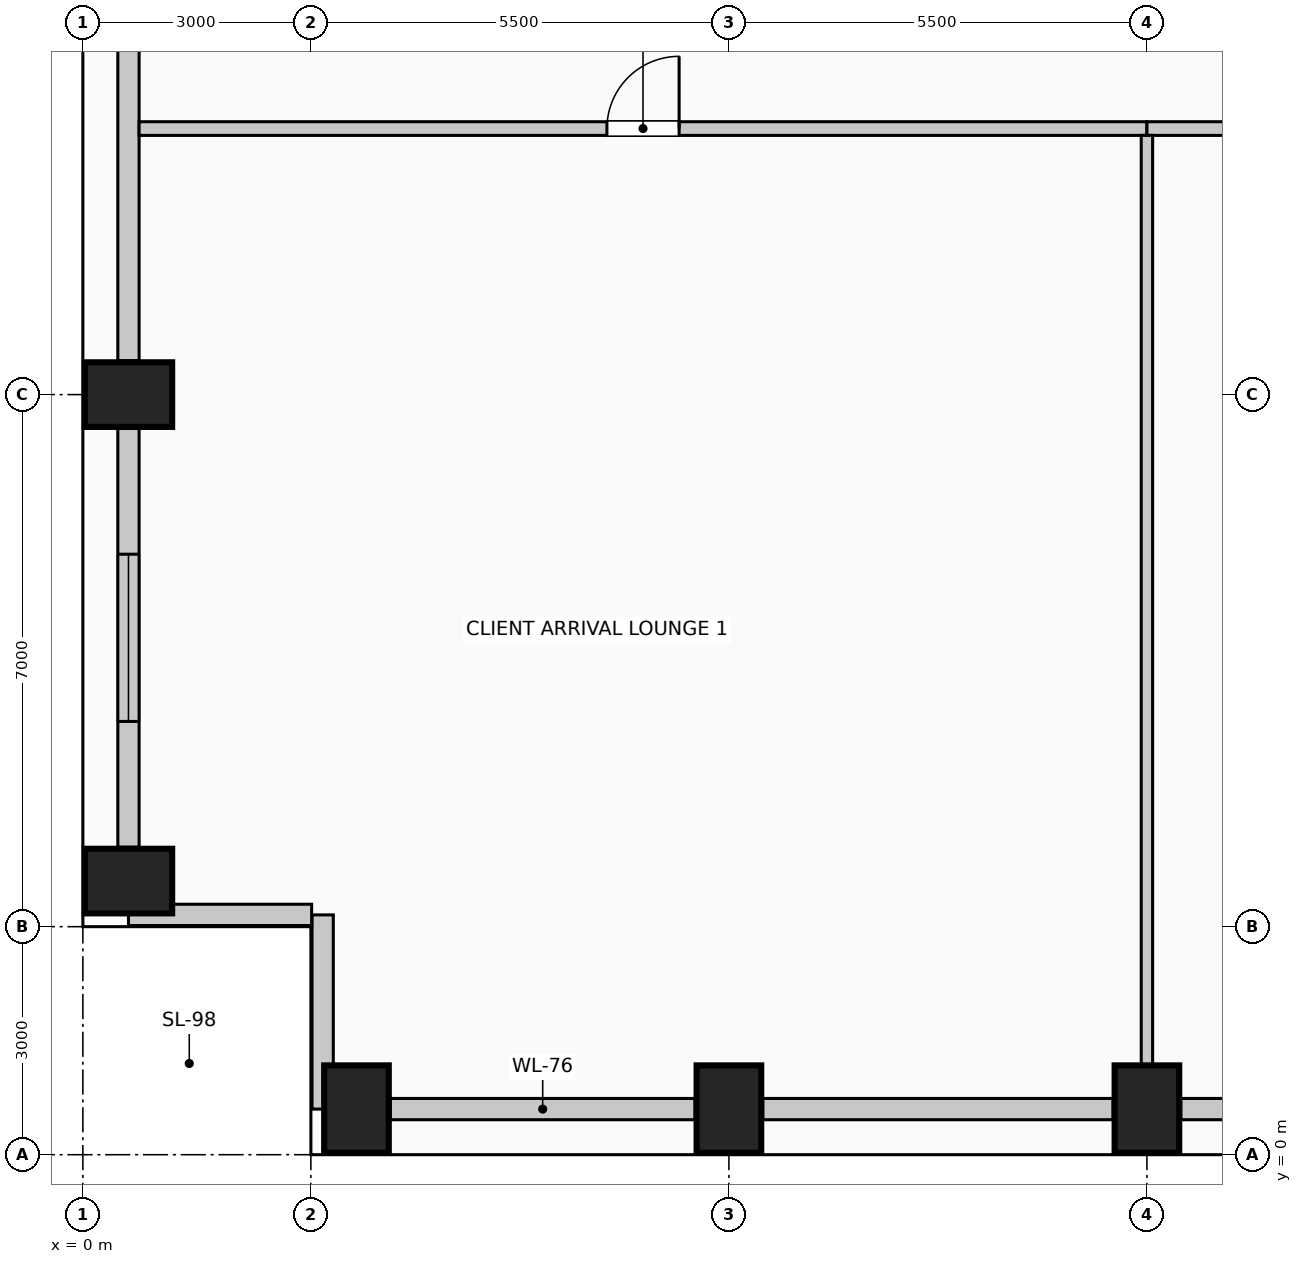
"""IFC4 building model, lengths in metres.
Left out: names, types, materials, properties, quantities, classifications, styles, units other than length and angle.
Written with IfcOpenShell. Run it as: python <this file> out.ifc"""

import sys

from ifc_helpers import new_model, si_unit, direction, frame, frame_2d, origin, origin_2d, place, context, subcontext, project, spatial, rectangle, extrude, element, fill, save


model = new_model("IFC4")
c1 = context("Model", 3, precision=1e-05, world=origin(), true_north=direction((0.0, 1.0)))
c2 = subcontext(c1, "Body", "Model", "MODEL_VIEW")
j1 = project(units=[si_unit("LENGTHUNIT", "METRE"), si_unit("PLANEANGLEUNIT", "RADIAN")], contexts=[c1])
p1 = place(None, origin())
s1 = spatial("IfcSite", under=j1, at=p1, CompositionType="ELEMENT")
p2 = place(p1, origin())
s2 = spatial("IfcBuilding", under=s1, at=p2, CompositionType="ELEMENT")
p3 = place(p2, frame((0.0, 0.0, 108.6)))
s3 = spatial("IfcBuildingStorey", under=s2, at=p3, CompositionType="ELEMENT", Elevation=108.6)
for number, where, z_axis, x_axis in (
    (1, (3.6, 0.6, 0.0), (0.0, 0.0, 1.0), (1.0, 0.0, 0.0)),
    (2, (8.5, 0.6, 0.0), (0.0, 0.0, 1.0), (1.0, 0.0, 0.0)),
    (3, (14.0, 0.6, 0.0), (0.0, 0.0, 1.0), (1.0, 0.0, 0.0)),
    (4, (0.6, 3.6, 0.0), (0.0, 0.0, 1.0), (0.0, 1.0, 0.0)),
    (5, (0.6, 10.0, 0.0), (0.0, 0.0, 1.0), (0.0, 1.0, 0.0)),
):
    element("IfcColumn", number, at=place(p3, frame(where, z_axis=z_axis, x_axis=x_axis)), inside=s3, PredefinedType="COLUMN", context=c2, shape_type="SweptSolid", body=[
        extrude(rectangle(XDim=0.85, YDim=1.15, at=origin_2d()), origin(), (0.0, 0.0, 1.0), 4.0),
    ])
p4 = place(p3, frame((8.055, 0.6, 0.0), z_axis=(0.0, 0.0, 1.0), x_axis=(-1.0, 0.0, 0.0)))
e6 = element("IfcWall", 6, at=p4, inside=s3, PredefinedType="SOLIDWALL", context=c2, shape_type="SweptSolid", body=[
    extrude(rectangle(XDim=4.01, YDim=0.28, at=frame_2d((2.005, 0.0))), origin(), (0.0, 0.0, 1.0), 2.875),
])
p5 = place(p3, frame((13.555, 0.6, 0.0), z_axis=(0.0, 0.0, 1.0), x_axis=(-1.0, 0.0, 0.0)))
e7 = element("IfcWall", 7, at=p5, inside=s3, PredefinedType="SOLIDWALL", context=c2, shape_type="SweptSolid", body=[
    extrude(rectangle(XDim=4.61, YDim=0.28, at=frame_2d((2.305, 0.0))), origin(), (0.0, 0.0, 1.0), 2.875),
])
p6 = place(p3, frame((15.83, 0.6, 0.0), z_axis=(0.0, 0.0, 1.0), x_axis=(-1.0, 0.0, 0.0)))
e8 = element("IfcWall", 8, at=p6, inside=s3, PredefinedType="SOLIDWALL", context=c2, shape_type="SweptSolid", body=[
    extrude(rectangle(XDim=1.385, YDim=0.28, at=frame_2d((0.692, 0.0))), origin(), (0.0, 0.0, 1.0), 2.875),
])
p7 = place(p3, frame((0.6, 4.045, 0.0), z_axis=(0.0, 0.0, 1.0), x_axis=(0.0, 1.0, 0.0)))
e9 = element("IfcWall", 9, at=p7, inside=s3, PredefinedType="SOLIDWALL", context=c2, shape_type="SweptSolid", body=[
    extrude(rectangle(XDim=5.51, YDim=0.28, at=frame_2d((2.755, 0.0))), origin(), (0.0, 0.0, 1.0), 2.875),
])
p8 = place(p7, frame((1.655, 0.0, 0.5)))
e10 = element("IfcOpeningElement", 10, at=p8, cuts=e9, PredefinedType="OPENING", context=c2, shape_type="SweptSolid", body=[
    extrude(rectangle(XDim=2.2, YDim=1.95, at=frame_2d((1.1, 0.975))), frame((0.0, 0.15, 0.0), z_axis=(0.0, -1.0, 0.0), x_axis=(1.0, 0.0, 0.0)), (0.0, 0.0, 1.0), 0.3),
])
p9 = place(p3, frame((0.6, 10.445, 0.0), z_axis=(0.0, 0.0, 1.0), x_axis=(0.0, 1.0, 0.0)))
e11 = element("IfcWall", 11, at=p9, inside=s3, PredefinedType="SOLIDWALL", context=c2, shape_type="SweptSolid", body=[
    extrude(rectangle(XDim=7.11, YDim=0.28, at=frame_2d((3.555, 0.0))), origin(), (0.0, 0.0, 1.0), 2.875),
])
p10 = place(p3, frame((3.155, 0.6, 0.0), z_axis=(0.0, 0.0, 1.0), x_axis=(0.0, 1.0, 0.0)))
e12 = element("IfcWall", 12, at=p10, inside=s3, PredefinedType="SOLIDWALL", context=c2, shape_type="SweptSolid", body=[
    extrude(rectangle(XDim=2.555, YDim=0.28, at=frame_2d((1.277, 0.0))), origin(), (0.0, 0.0, 1.0), 3.725),
])
p11 = place(p3, frame((3.01, 3.155, 0.0), z_axis=(0.0, 0.0, 1.0), x_axis=(-1.0, 0.0, 0.0)))
e13 = element("IfcWall", 13, at=p11, inside=s3, PredefinedType="SOLIDWALL", context=c2, shape_type="SweptSolid", body=[
    extrude(rectangle(XDim=2.41, YDim=0.28, at=frame_2d((1.205, 0.0))), origin(), (0.0, 0.0, 1.0), 3.725),
])
p12 = place(p3, frame((0.74, 13.5, 0.0), z_axis=(0.0, 0.0, 1.0), x_axis=(1.0, 0.0, 0.0)))
e14 = element("IfcWall", 14, at=p12, inside=s3, PredefinedType="PARTITIONING", context=c2, shape_type="SweptSolid", body=[
    extrude(rectangle(XDim=13.26, YDim=0.18, at=frame_2d((6.63, 0.0))), origin(), (0.0, 0.0, 1.0), 3.725),
])
p13 = place(p12, frame((6.155, 0.0, 0.0)))
e15 = element("IfcOpeningElement", 15, at=p13, cuts=e14, PredefinedType="OPENING", context=c2, shape_type="SweptSolid", body=[
    extrude(rectangle(XDim=0.95, YDim=2.15, at=frame_2d((0.475, 1.075))), frame((0.0, 0.1, 0.0), z_axis=(0.0, -1.0, 0.0), x_axis=(1.0, 0.0, 0.0)), (0.0, 0.0, 1.0), 0.2),
])
p14 = place(p3, frame((14.0, 13.5, 0.0), z_axis=(0.0, 0.0, 1.0), x_axis=(1.0, 0.0, 0.0)))
e16 = element("IfcWall", 16, at=p14, inside=s3, PredefinedType="PARTITIONING", context=c2, shape_type="SweptSolid", body=[
    extrude(rectangle(XDim=12.12, YDim=0.18, at=frame_2d((6.06, 0.0))), origin(), (0.0, 0.0, 1.0), 3.725),
])
p15 = place(p14, frame((5.535, 0.0, 0.0)))
e17 = element("IfcOpeningElement", 17, at=p15, cuts=e16, PredefinedType="OPENING", context=c2, shape_type="SweptSolid", body=[
    extrude(rectangle(XDim=1.05, YDim=2.15, at=frame_2d((0.525, 1.075))), frame((0.0, 0.1, 0.0), z_axis=(0.0, -1.0, 0.0), x_axis=(1.0, 0.0, 0.0)), (0.0, 0.0, 1.0), 0.2),
])
p16 = place(p3, frame((14.0, 1.175, 0.0), z_axis=(0.0, 0.0, 1.0), x_axis=(0.0, 1.0, 0.0)))
e18 = element("IfcWall", 18, at=p16, inside=s3, PredefinedType="PARTITIONING", context=c2, shape_type="SweptSolid", body=[
    extrude(rectangle(XDim=12.235, YDim=0.15, at=frame_2d((6.117, 0.0))), origin(), (0.0, 0.0, 1.0), 3.725),
])
p17 = place(p8, origin())
e19 = element("IfcWindow", 19, at=p17, inside=s3, PartitioningType="SINGLE_PANEL", PredefinedType="WINDOW", context=c2, shape_type="SweptSolid", body=[
    extrude(rectangle(XDim=2.2, YDim=1.95, at=frame_2d((1.1, 0.975))), frame((0.0, 0.03, 0.0), z_axis=(0.0, -1.0, 0.0), x_axis=(1.0, 0.0, 0.0)), (0.0, 0.0, 1.0), 0.06),
])
fill(e10, e19)
p18 = place(p13, origin())
e20 = element("IfcDoor", 20, at=p18, inside=s3, OperationType="SINGLE_SWING_RIGHT", PredefinedType="DOOR", context=c2, shape_type="SweptSolid", body=[
    extrude(rectangle(XDim=0.95, YDim=2.15, at=frame_2d((0.475, 1.075))), frame((0.0, 0.025, 0.0), z_axis=(0.0, -1.0, 0.0), x_axis=(1.0, 0.0, 0.0)), (0.0, 0.0, 1.0), 0.05),
])
fill(e15, e20)
save(model, sys.argv[1])
